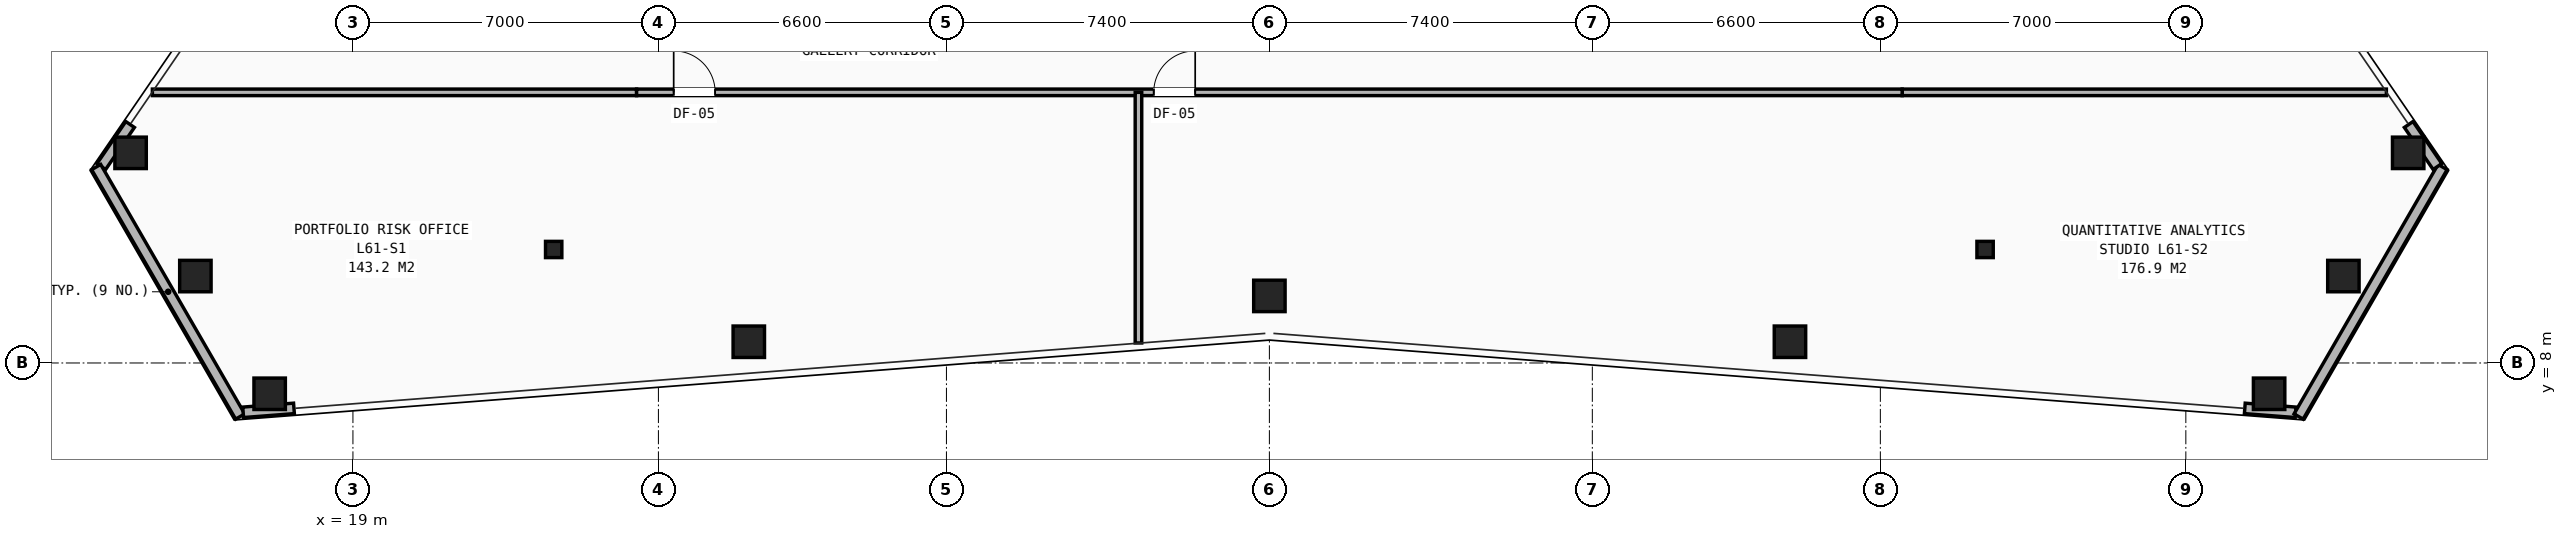
"""IFC4 building model, lengths in metres.
Left out: names, types, materials, properties, quantities, classifications, styles, units other than length and angle.
Written with IfcOpenShell. Run it as: python <this file> out.ifc"""

import sys

from ifc_helpers import new_model, si_unit, direction, frame, frame_2d, origin, origin_2d, place, context, subcontext, project, spatial, rectangle, hollow_rectangle, i_section, extrude, element, fill, save


model = new_model("IFC4")
c1 = context("Model", 3, precision=1e-05, world=origin(), true_north=direction((0.0, 1.0)))
c2 = subcontext(c1, "Body", "Model", "MODEL_VIEW")
j1 = project(units=[si_unit("LENGTHUNIT", "METRE"), si_unit("PLANEANGLEUNIT", "RADIAN")], contexts=[c1])
p1 = place(None, origin())
s1 = spatial("IfcSite", under=j1, at=p1, CompositionType="ELEMENT")
p2 = place(p1, origin())
s2 = spatial("IfcBuilding", under=s1, at=p2, CompositionType="ELEMENT")
p3 = place(p2, frame((0.0, 0.0, 215.4)))
s3 = spatial("IfcBuildingStorey", under=s2, at=p3, CompositionType="ELEMENT", Elevation=215.4)
for number, where, z_axis, x_axis in (
    (1, (23.6, 10.6, 0.0), (0.0, 0.0, 1.0), (1.0, 0.0, 0.0)),
    (2, (56.4, 10.6, 0.0), (0.0, 0.0, 1.0), (1.0, 0.0, 0.0)),
):
    element("IfcColumn", number, at=place(p3, frame(where, z_axis=z_axis, x_axis=x_axis)), inside=s3, PredefinedType="COLUMN", context=c2, shape_type="SweptSolid", body=[
        extrude(i_section(OverallWidth=0.374, OverallDepth=0.372, WebThickness=0.016, FlangeThickness=0.026, at=origin_2d()), origin(), (0.0, 0.0, 1.0), 3.5),
    ])
for number, where, z_axis, x_axis in (
    (3, (13.905, 12.814, 0.0), (0.0, 0.0, 1.0), (1.0, 0.0, 0.0)),
    (4, (15.39, 9.991, 0.0), (0.0, 0.0, 1.0), (1.0, 0.0, 0.0)),
    (5, (17.092, 7.294, 0.0), (0.0, 0.0, 1.0), (1.0, 0.0, 0.0)),
    (6, (28.071, 8.486, 0.0), (0.0, 0.0, 1.0), (1.0, 0.0, 0.0)),
    (7, (40.0, 9.537, 0.0), (0.0, 0.0, 1.0), (1.0, 0.0, 0.0)),
    (8, (51.929, 8.486, 0.0), (0.0, 0.0, 1.0), (1.0, 0.0, 0.0)),
    (9, (62.908, 7.294, 0.0), (0.0, 0.0, 1.0), (1.0, 0.0, 0.0)),
    (10, (64.61, 9.991, 0.0), (0.0, 0.0, 1.0), (1.0, 0.0, 0.0)),
    (11, (66.095, 12.814, 0.0), (0.0, 0.0, 1.0), (1.0, 0.0, 0.0)),
):
    element("IfcColumn", number, at=place(p3, frame(where, z_axis=z_axis, x_axis=x_axis)), inside=s3, PredefinedType="COLUMN", context=c2, shape_type="SweptSolid", body=[
        extrude(hollow_rectangle(XDim=0.72, YDim=0.72, WallThickness=0.05, at=origin_2d()), origin(), (0.0, 0.0, 1.0), 3.5),
    ])
p4 = place(p3, frame((13.894, 13.463, 0.0), z_axis=(0.0, 0.0, 1.0), x_axis=(-0.565223534604, -0.824937789127, 0.0)))
e12 = element("IfcWall", 12, at=p4, inside=s3, PredefinedType="SHEAR", context=c2, shape_type="SweptSolid", body=[
    extrude(rectangle(XDim=1.167, YDim=0.24, at=frame_2d((0.584, 0.0))), origin(), (0.0, 0.0, 1.0), 2.623),
])
p5 = place(p3, frame((16.416, 6.773, 0.0), z_axis=(0.0, 0.0, 1.0), x_axis=(-0.500002094529, 0.866024194504, 0.0)))
e13 = element("IfcWall", 13, at=p5, inside=s3, PredefinedType="SHEAR", context=c2, shape_type="SweptSolid", body=[
    extrude(rectangle(XDim=6.6, YDim=0.24, at=frame_2d((3.3, 0.0))), origin(), (0.0, 0.0, 1.0), 2.623),
])
for number, where, z_axis, x_axis in (
    (14, (16.485, 6.87, 0.0), (0.0, 0.0, 1.0), (0.997, 0.077, 0.0)),
    (15, (62.351, 6.96, 0.0), (0.0, 0.0, 1.0), (0.997, -0.077, 0.0)),
):
    element("IfcWall", number, at=place(p3, frame(where, z_axis=z_axis, x_axis=x_axis)), inside=s3, PredefinedType="SHEAR", context=c2, shape_type="SweptSolid", body=[
        extrude(rectangle(XDim=1.167, YDim=0.24, at=frame_2d((0.584, 0.0))), origin(), (0.0, 0.0, 1.0), 2.623),
    ])
p6 = place(p3, frame((66.884, 12.489, 0.0), z_axis=(0.0, 0.0, 1.0), x_axis=(-0.500002094529, -0.866024194504, 0.0)))
e16 = element("IfcWall", 16, at=p6, inside=s3, PredefinedType="SHEAR", context=c2, shape_type="SweptSolid", body=[
    extrude(rectangle(XDim=6.6, YDim=0.24, at=frame_2d((3.3, 0.0))), origin(), (0.0, 0.0, 1.0), 2.623),
])
p7 = place(p3, frame((66.766, 12.5, 0.0), z_axis=(0.0, 0.0, 1.0), x_axis=(-0.565223534604, 0.824937789127, 0.0)))
e17 = element("IfcWall", 17, at=p7, inside=s3, PredefinedType="SHEAR", context=c2, shape_type="SweptSolid", body=[
    extrude(rectangle(XDim=1.167, YDim=0.24, at=frame_2d((0.584, 0.0))), origin(), (0.0, 0.0, 1.0), 2.623),
])
for number, where, z_axis, x_axis in (
    (18, (14.405, 14.2, 0.0), (0.0, 0.0, 1.0), (1.0, 0.0, 0.0)),
    (19, (54.5, 14.2, 0.0), (0.0, 0.0, 1.0), (1.0, 0.0, 0.0)),
):
    element("IfcWall", number, at=place(p3, frame(where, z_axis=z_axis, x_axis=x_axis)), inside=s3, PredefinedType="PARTITIONING", context=c2, shape_type="SweptSolid", body=[
        extrude(rectangle(XDim=11.095, YDim=0.15, at=frame_2d((5.548, 0.0))), origin(), (0.0, 0.0, 1.0), 2.292),
    ])
p8 = place(p3, frame((25.5, 14.2, 0.0), z_axis=(0.0, 0.0, 1.0), x_axis=(1.0, 0.0, 0.0)))
e20 = element("IfcWall", 20, at=p8, inside=s3, PredefinedType="PARTITIONING", context=c2, shape_type="SweptSolid", body=[
    extrude(rectangle(XDim=29.0, YDim=0.15, at=frame_2d((14.5, 0.0))), origin(), (0.0, 0.0, 1.0), 2.292),
])
p9 = place(p8, frame((0.85, 0.0, 0.0)))
e21 = element("IfcOpeningElement", 21, at=p9, cuts=e20, PredefinedType="OPENING", context=c2, shape_type="SweptSolid", body=[
    extrude(rectangle(XDim=0.95, YDim=2.1, at=frame_2d((0.475, 1.05))), frame((0.0, 0.085, 0.0), z_axis=(0.0, -1.0, 0.0), x_axis=(1.0, 0.0, 0.0)), (0.0, 0.0, 1.0), 0.17),
])
p10 = place(p8, frame((11.85, 0.0, 0.0)))
e22 = element("IfcOpeningElement", 22, at=p10, cuts=e20, PredefinedType="OPENING", context=c2, shape_type="SweptSolid", body=[
    extrude(rectangle(XDim=0.95, YDim=2.1, at=frame_2d((0.475, 1.05))), frame((0.0, 0.085, 0.0), z_axis=(0.0, -1.0, 0.0), x_axis=(1.0, 0.0, 0.0)), (0.0, 0.0, 1.0), 0.17),
])
p11 = place(p3, frame((37.0, 8.458, 0.0), z_axis=(0.0, 0.0, 1.0), x_axis=(0.0, 1.0, 0.0)))
e23 = element("IfcWall", 23, at=p11, inside=s3, PredefinedType="PARTITIONING", context=c2, shape_type="SweptSolid", body=[
    extrude(rectangle(XDim=5.741, YDim=0.15, at=frame_2d((2.871, 0.0))), origin(), (0.0, 0.0, 1.0), 2.292),
])
p12 = place(p9, origin())
e24 = element("IfcDoor", 24, at=p12, inside=s3, OperationType="SINGLE_SWING_LEFT", PredefinedType="DOOR", context=c2, shape_type="SweptSolid", body=[
    extrude(rectangle(XDim=0.95, YDim=2.1, at=frame_2d((0.475, 1.05))), frame((0.0, 0.025, 0.0), z_axis=(0.0, -1.0, 0.0), x_axis=(1.0, 0.0, 0.0)), (0.0, 0.0, 1.0), 0.05),
])
fill(e21, e24)
p13 = place(p10, origin())
e25 = element("IfcDoor", 25, at=p13, inside=s3, OperationType="SINGLE_SWING_RIGHT", PredefinedType="DOOR", context=c2, shape_type="SweptSolid", body=[
    extrude(rectangle(XDim=0.95, YDim=2.1, at=frame_2d((0.475, 1.05))), frame((0.0, 0.025, 0.0), z_axis=(0.0, -1.0, 0.0), x_axis=(1.0, 0.0, 0.0)), (0.0, 0.0, 1.0), 0.05),
])
fill(e22, e25)
save(model, sys.argv[1])
